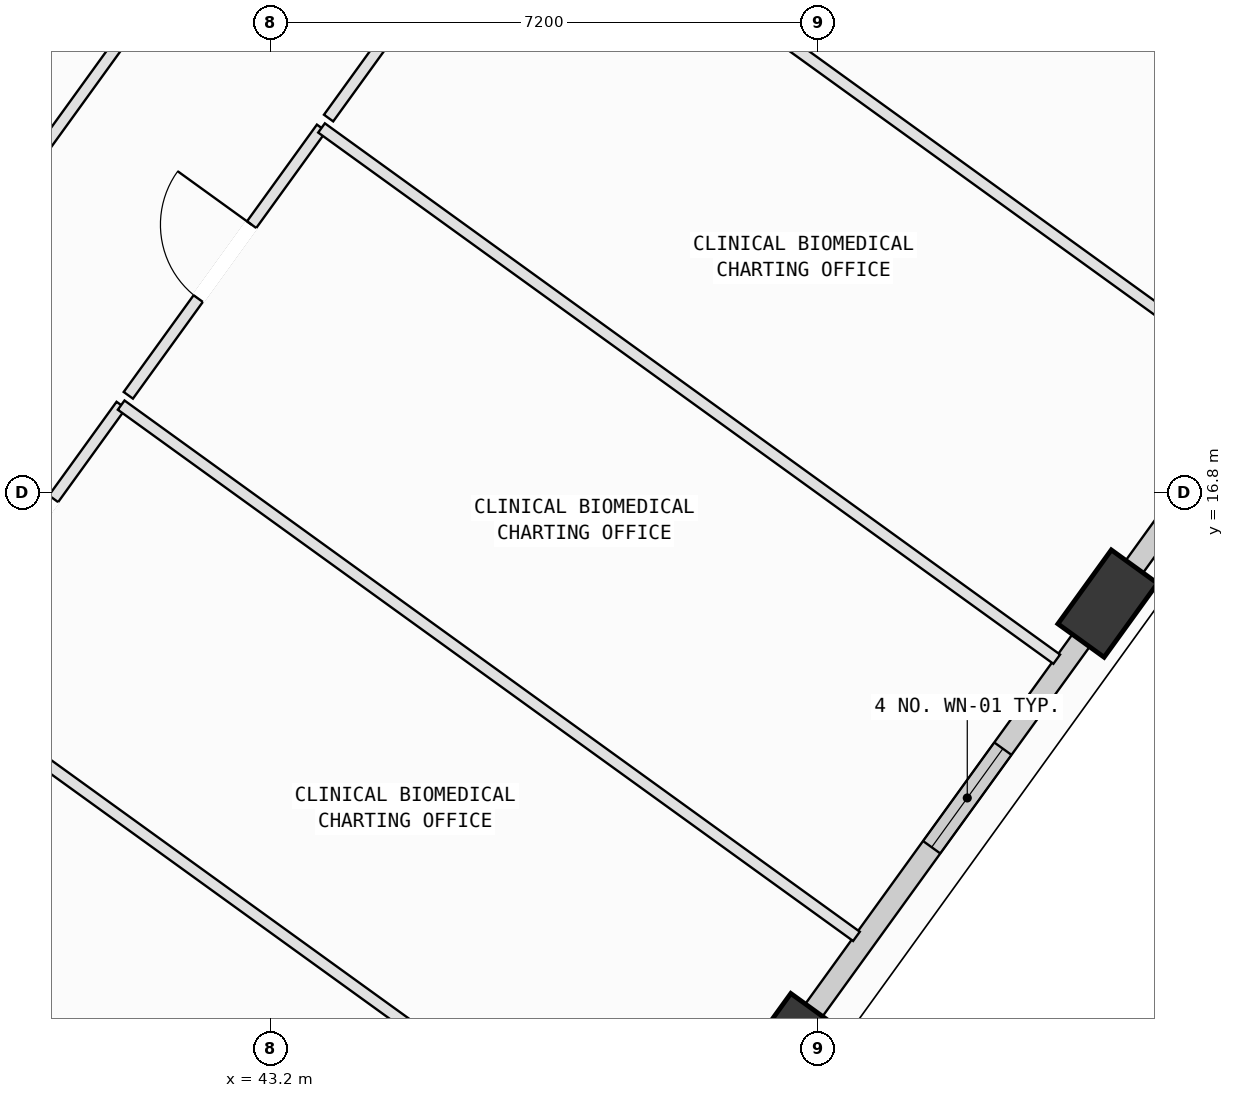
"""IFC4 building model, lengths in metres.
Left out: names, types, materials, properties, quantities, classifications, styles, units other than length and angle.
Written with IfcOpenShell. Run it as: python <this file> out.ifc"""

import sys

from ifc_helpers import new_model, si_unit, direction, frame, frame_2d, origin, origin_2d, place, context, subcontext, project, spatial, rectangle, extrude, element, fill, save


model = new_model("IFC4")
c1 = context("Model", 3, precision=1e-05, world=origin(), true_north=direction((0.0, 1.0)))
c2 = subcontext(c1, "Body", "Model", "MODEL_VIEW")
j1 = project(units=[si_unit("LENGTHUNIT", "METRE"), si_unit("PLANEANGLEUNIT", "RADIAN")], contexts=[c1])
p1 = place(None, origin())
s1 = spatial("IfcSite", under=j1, at=p1, CompositionType="ELEMENT")
p2 = place(p1, origin())
s2 = spatial("IfcBuilding", under=s1, at=p2, CompositionType="ELEMENT")
p3 = place(p2, frame((0.0, 0.0, 255.2)))
s3 = spatial("IfcBuildingStorey", under=s2, at=p3, CompositionType="ELEMENT", Elevation=255.2)
p4 = place(p3, frame((49.995, 9.5, 0.002), z_axis=(0.062592857053, 0.068189108606, 0.995706974824), x_axis=(-0.977221341298, -0.198518401918, 0.075025956915)))
e1 = element("IfcColumn", 1, at=p4, inside=s3, PredefinedType="COLUMN", context=c2, shape_type="SweptSolid", body=[
    extrude(rectangle(XDim=1.2, YDim=0.75, at=origin_2d()), origin(), (0.0, 0.0, 1.0), 4.014),
])
p5 = place(p3, frame((54.212, 15.335, 0.002), z_axis=(0.038318426238, 0.085395349901, 0.995610030296), x_axis=(-0.864713750132, -0.496502169968, 0.075866498211)))
e2 = element("IfcColumn", 2, at=p5, inside=s3, PredefinedType="COLUMN", context=c2, shape_type="SweptSolid", body=[
    extrude(rectangle(XDim=1.2, YDim=0.75, at=origin_2d()), origin(), (0.0, 0.0, 1.0), 4.014),
])
p6 = place(p3, frame((54.088, 15.164, 0.0), z_axis=(0.0, 0.0, 1.0), x_axis=(-0.585656107045, -0.810559636474, 0.0)))
e3 = element("IfcWall", 3, at=p6, inside=s3, PredefinedType="SOLIDWALL", context=c2, shape_type="SweptSolid", body=[
    extrude(rectangle(XDim=6.407, YDim=0.28, at=frame_2d((3.203, 0.0))), origin(), (0.0, 0.0, 1.0), 3.265),
])
p7 = place(p6, frame((2.143, 0.0, 0.75)))
e4 = element("IfcOpeningElement", 4, at=p7, cuts=e3, PredefinedType="OPENING", context=c2, shape_type="SweptSolid", body=[
    extrude(rectangle(XDim=1.6, YDim=1.95, at=frame_2d((0.8, 0.975))), frame((0.0, 0.15, 0.0), z_axis=(0.0, -1.0, 0.0), x_axis=(1.0, 0.0, 0.0)), (0.0, 0.0, 1.0), 0.3),
])
p8 = place(p3, frame((58.31, 21.008, 0.0), z_axis=(0.0, 0.0, 1.0), x_axis=(-0.585669695787, -0.810549817986, 0.0)))
e5 = element("IfcWall", 5, at=p8, inside=s3, PredefinedType="SOLIDWALL", context=c2, shape_type="SweptSolid", body=[
    extrude(rectangle(XDim=6.418, YDim=0.28, at=frame_2d((3.209, 0.0))), origin(), (0.0, 0.0, 1.0), 3.265),
])
p9 = place(p8, frame((0.56, 0.0, 0.75)))
e6 = element("IfcOpeningElement", 6, at=p9, cuts=e5, PredefinedType="OPENING", context=c2, shape_type="SweptSolid", body=[
    extrude(rectangle(XDim=2.0, YDim=1.95, at=frame_2d((1.0, 0.975))), frame((0.0, 0.15, 0.0), z_axis=(0.0, -1.0, 0.0), x_axis=(1.0, 0.0, 0.0)), (0.0, 0.0, 1.0), 0.3),
])
p10 = place(p3, frame((36.15, 10.762, 0.0), z_axis=(0.0, 0.0, 1.0), x_axis=(0.810568850791, -0.585643354037, 0.0)))
e7 = element("IfcWall", 7, at=p10, inside=s3, PredefinedType="PARTITIONING", context=c2, shape_type="SweptSolid", body=[
    extrude(rectangle(XDim=12.192, YDim=0.15, at=frame_2d((6.096, 0.0))), origin(), (0.0, 0.0, 1.0), 3.165),
])
p11 = place(p10, frame((5.666, 0.0, 0.0)))
e8 = element("IfcOpeningElement", 8, at=p11, cuts=e7, PredefinedType="OPENING", context=c2, shape_type="SweptSolid", body=[
    extrude(rectangle(XDim=0.86, YDim=2.06, at=frame_2d((0.43, 1.03))), frame((0.0, 0.085, 0.0), z_axis=(0.0, -1.0, 0.0), x_axis=(1.0, 0.0, 0.0)), (0.0, 0.0, 1.0), 0.17),
])
p12 = place(p3, frame((38.655, 14.38, 0.0), z_axis=(0.0, 0.0, 1.0), x_axis=(0.810553530126, -0.585664558259, 0.0)))
e9 = element("IfcWall", 9, at=p12, inside=s3, PredefinedType="PARTITIONING", context=c2, shape_type="SweptSolid", body=[
    extrude(rectangle(XDim=11.935, YDim=0.15, at=frame_2d((5.968, 0.0))), origin(), (0.0, 0.0, 1.0), 3.78),
])
p13 = place(p3, frame((38.749, 14.51, 0.0), z_axis=(0.0, 0.0, 1.0), x_axis=(0.585587255826, 0.810609379303, 0.0)))
e10 = element("IfcWall", 10, at=p13, inside=s3, PredefinedType="PARTITIONING", context=c2, shape_type="SweptSolid", body=[
    extrude(rectangle(XDim=4.24, YDim=0.15, at=frame_2d((2.12, 0.0))), origin(), (0.0, 0.0, 1.0), 3.78),
])
p14 = place(p13, frame((1.52, 0.0, 0.0)))
e11 = element("IfcOpeningElement", 11, at=p14, cuts=e10, PredefinedType="OPENING", context=c2, shape_type="SweptSolid", body=[
    extrude(rectangle(XDim=1.2, YDim=2.15, at=frame_2d((0.6, 1.075))), frame((0.0, 0.085, 0.0), z_axis=(0.0, -1.0, 0.0), x_axis=(1.0, 0.0, 0.0)), (0.0, 0.0, 1.0), 0.17),
])
p15 = place(p3, frame((41.232, 17.947, 0.0), z_axis=(0.0, 0.0, 1.0), x_axis=(0.810553530126, -0.585664558259, 0.0)))
e12 = element("IfcWall", 12, at=p15, inside=s3, PredefinedType="PARTITIONING", context=c2, shape_type="SweptSolid", body=[
    extrude(rectangle(XDim=11.935, YDim=0.15, at=frame_2d((5.968, 0.0))), origin(), (0.0, 0.0, 1.0), 3.78),
])
p16 = place(p3, frame((41.326, 18.076, 0.0), z_axis=(0.0, 0.0, 1.0), x_axis=(0.585667160303, 0.810551650016, 0.0)))
e13 = element("IfcWall", 13, at=p16, inside=s3, PredefinedType="PARTITIONING", context=c2, shape_type="SweptSolid", body=[
    extrude(rectangle(XDim=4.34, YDim=0.15, at=frame_2d((2.17, 0.0))), origin(), (0.0, 0.0, 1.0), 3.78),
])
p17 = place(p16, frame((1.57, 0.0, 0.0)))
e14 = element("IfcOpeningElement", 14, at=p17, cuts=e13, PredefinedType="OPENING", context=c2, shape_type="SweptSolid", body=[
    extrude(rectangle(XDim=1.2, YDim=2.15, at=frame_2d((0.6, 1.075))), frame((0.0, 0.085, 0.0), z_axis=(0.0, -1.0, 0.0), x_axis=(1.0, 0.0, 0.0)), (0.0, 0.0, 1.0), 0.17),
])
p18 = place(p3, frame((43.868, 21.594, 0.0), z_axis=(0.0, 0.0, 1.0), x_axis=(0.810525461994, -0.585703402295, 0.0)))
e15 = element("IfcWall", 15, at=p18, inside=s3, PredefinedType="PARTITIONING", context=c2, shape_type="SweptSolid", body=[
    extrude(rectangle(XDim=11.934, YDim=0.15, at=frame_2d((5.967, 0.0))), origin(), (0.0, 0.0, 1.0), 3.78),
])
p19 = place(p3, frame((43.961, 21.724, 0.0), z_axis=(0.0, 0.0, 1.0), x_axis=(0.585693863478, 0.810532354865, 0.0)))
e16 = element("IfcWall", 16, at=p19, inside=s3, PredefinedType="PARTITIONING", context=c2, shape_type="SweptSolid", body=[
    extrude(rectangle(XDim=4.34, YDim=0.15, at=frame_2d((2.17, 0.0))), origin(), (0.0, 0.0, 1.0), 3.78),
])
p20 = place(p19, frame((1.57, 0.0, 0.0)))
e17 = element("IfcOpeningElement", 17, at=p20, cuts=e16, PredefinedType="OPENING", context=c2, shape_type="SweptSolid", body=[
    extrude(rectangle(XDim=1.2, YDim=2.15, at=frame_2d((0.6, 1.075))), frame((0.0, 0.085, 0.0), z_axis=(0.0, -1.0, 0.0), x_axis=(1.0, 0.0, 0.0)), (0.0, 0.0, 1.0), 0.17),
])
p21 = place(p3, frame((46.503, 25.242, 0.0), z_axis=(0.0, 0.0, 1.0), x_axis=(0.810553530126, -0.585664558259, 0.0)))
e18 = element("IfcWall", 18, at=p21, inside=s3, PredefinedType="PARTITIONING", context=c2, shape_type="SweptSolid", body=[
    extrude(rectangle(XDim=11.935, YDim=0.15, at=frame_2d((5.968, 0.0))), origin(), (0.0, 0.0, 1.0), 3.78),
])
p22 = place(p3, frame((54.738, 15.671, 0.0), z_axis=(0.0, 0.0, 1.0), x_axis=(-0.585951871419, -0.810345854793, 0.0)))
e19 = element("IfcWall", 19, at=p22, inside=s3, PredefinedType="PARTITIONING", context=c2, shape_type="SweptSolid", body=[
    extrude(rectangle(XDim=0.792, YDim=0.15, at=frame_2d((0.396, 0.0))), origin(), (0.0, 0.0, 1.0), 3.265),
])
p23 = place(p3, frame((49.139, 28.889, 0.0), z_axis=(0.0, 0.0, 1.0), x_axis=(0.810544932865, -0.585676456593, 0.0)))
e20 = element("IfcWall", 20, at=p23, inside=s3, PredefinedType="PARTITIONING", context=c2, shape_type="SweptSolid", body=[
    extrude(rectangle(XDim=11.363, YDim=0.15, at=frame_2d((5.682, 0.0))), origin(), (0.0, 0.0, 1.0), 3.78),
])
p24 = place(p3, frame((41.326, 22.875, 0.0), z_axis=(0.0, 0.0, 1.0), x_axis=(-0.585638666842, -0.810572237311, 0.0)))
e21 = element("IfcWall", 21, at=p24, inside=s3, PredefinedType="PARTITIONING", context=c2, shape_type="SweptSolid", body=[
    extrude(rectangle(XDim=2.708, YDim=0.15, at=frame_2d((1.354, 0.0))), origin(), (0.0, 0.0, 1.0), 3.78),
])
p25 = place(p7, origin())
e22 = element("IfcWindow", 22, at=p25, inside=s3, PartitioningType="SINGLE_PANEL", PredefinedType="WINDOW", context=c2, shape_type="SweptSolid", body=[
    extrude(rectangle(XDim=1.6, YDim=1.95, at=frame_2d((0.8, 0.975))), frame((0.0, 0.03, 0.0), z_axis=(0.0, -1.0, 0.0), x_axis=(1.0, 0.0, 0.0)), (0.0, 0.0, 1.0), 0.06),
])
fill(e4, e22)
p26 = place(p14, origin())
e23 = element("IfcDoor", 23, at=p26, inside=s3, OperationType="SINGLE_SWING_LEFT", PredefinedType="DOOR", context=c2, shape_type="SweptSolid", body=[
    extrude(rectangle(XDim=1.2, YDim=2.15, at=frame_2d((0.6, 1.075))), frame((0.0, 0.025, 0.0), z_axis=(0.0, -1.0, 0.0), x_axis=(1.0, 0.0, 0.0)), (0.0, 0.0, 1.0), 0.05),
])
fill(e11, e23)
p27 = place(p17, origin())
e24 = element("IfcDoor", 24, at=p27, inside=s3, OperationType="SINGLE_SWING_RIGHT", PredefinedType="DOOR", context=c2, shape_type="SweptSolid", body=[
    extrude(rectangle(XDim=1.2, YDim=2.15, at=frame_2d((0.6, 1.075))), frame((0.0, 0.025, 0.0), z_axis=(0.0, -1.0, 0.0), x_axis=(1.0, 0.0, 0.0)), (0.0, 0.0, 1.0), 0.05),
])
fill(e14, e24)
save(model, sys.argv[1])
